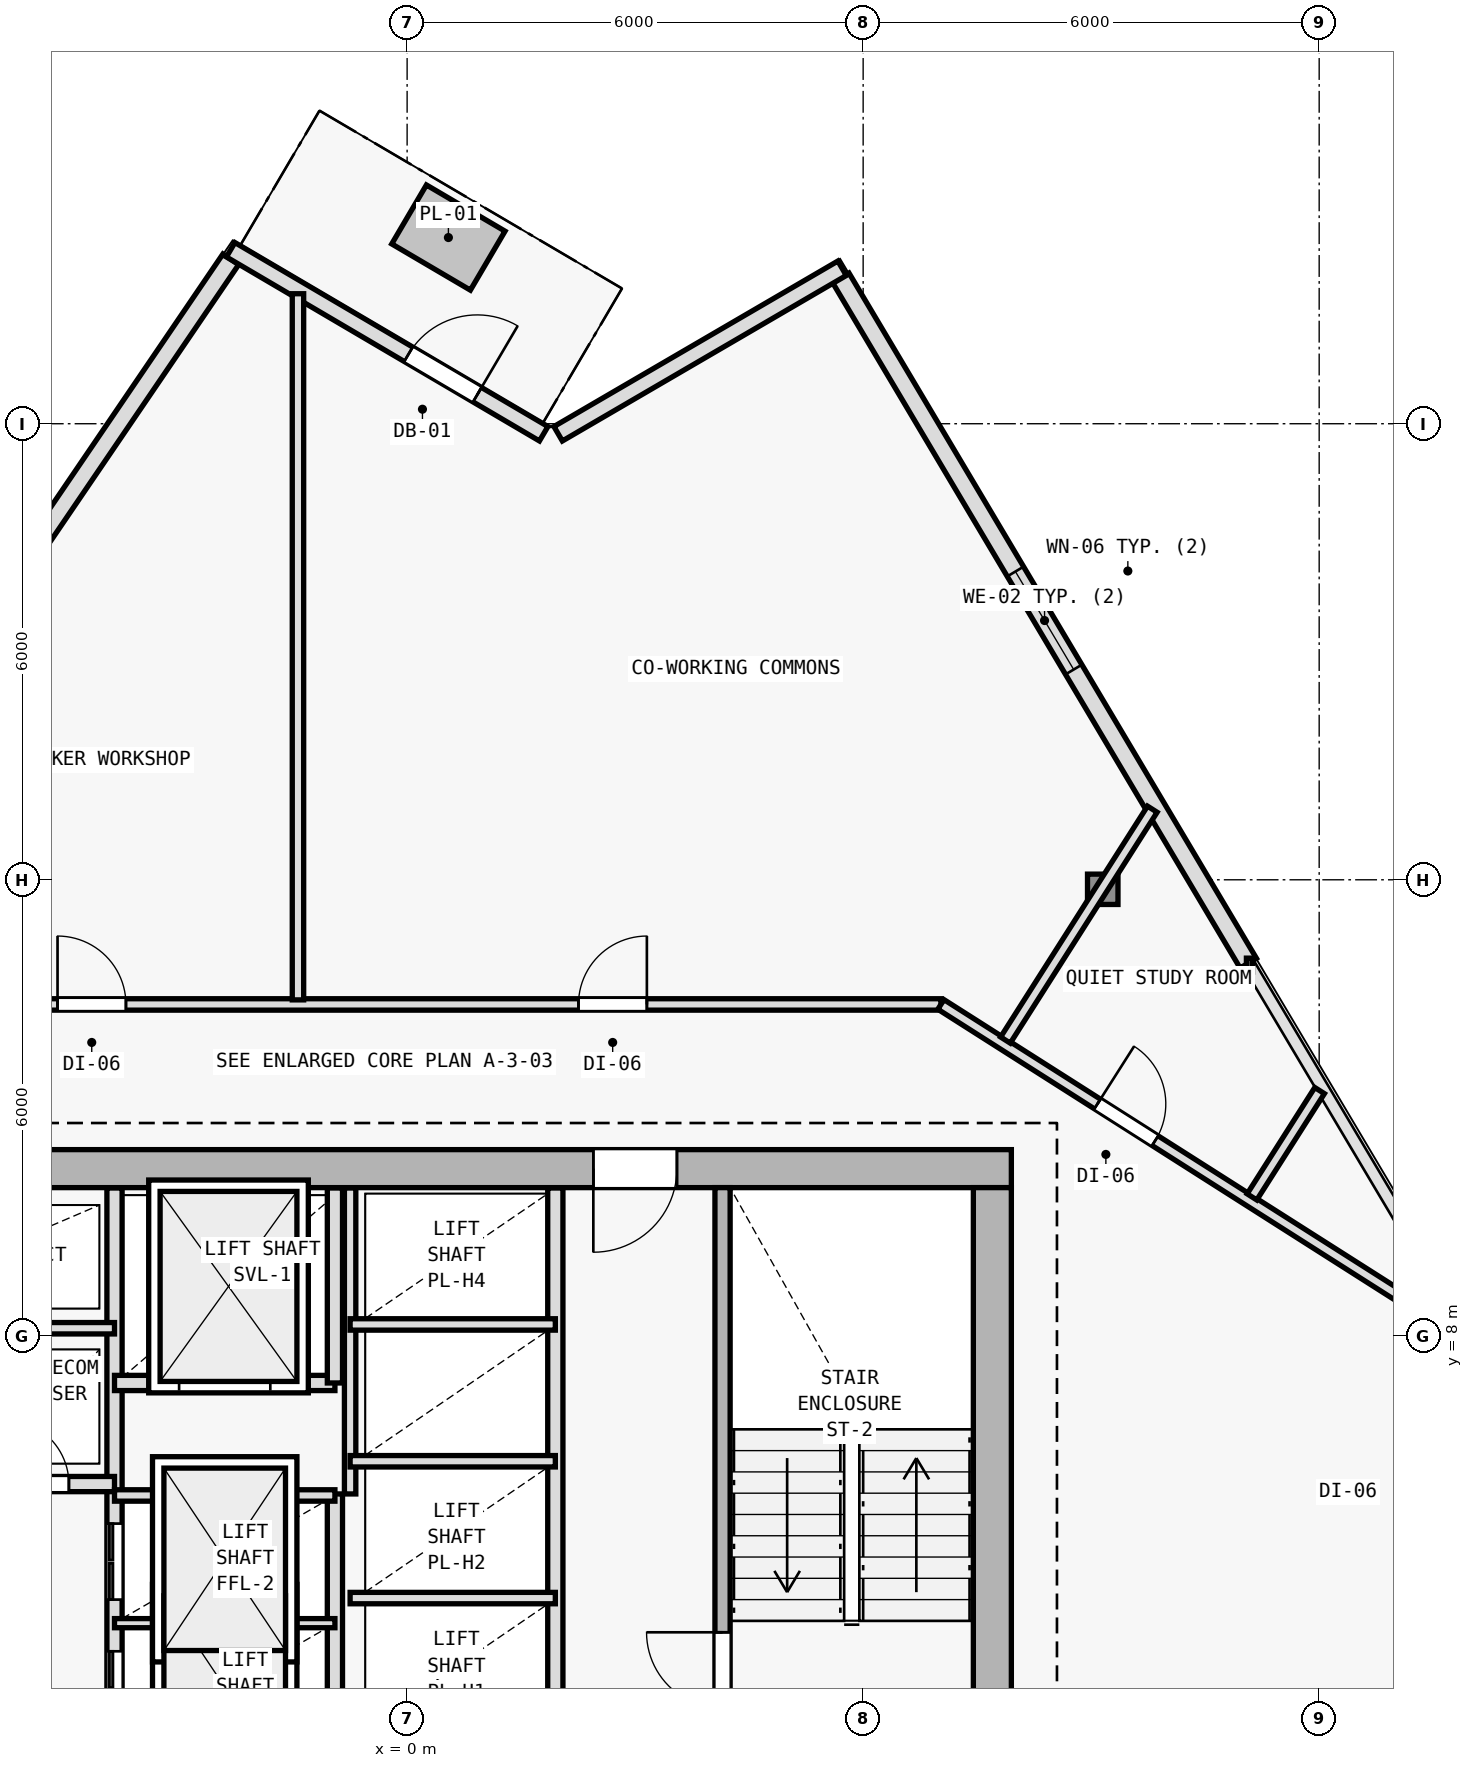
"""IFC4 building model, lengths in metres.
Left out: names, types, materials, properties, quantities, classifications, styles, units other than length and angle.
Written with IfcOpenShell. Run it as: python <this file> out.ifc"""

import sys

from ifc_helpers import new_model, si_unit, direction, frame, frame_2d, origin, origin_2d, place, context, subcontext, project, spatial, rectangle, i_section, extrude, element, fill, save


model = new_model("IFC4")
c1 = context("Model", 3, precision=1e-05, world=origin(), true_north=direction((0.0, 1.0)))
c2 = subcontext(c1, "Body", "Model", "MODEL_VIEW")
j1 = project(units=[si_unit("LENGTHUNIT", "METRE"), si_unit("PLANEANGLEUNIT", "RADIAN")], contexts=[c1])
p1 = place(None, origin())
s1 = spatial("IfcSite", under=j1, at=p1, CompositionType="ELEMENT")
p2 = place(p1, origin())
s2 = spatial("IfcBuilding", under=s1, at=p2, CompositionType="ELEMENT")
p3 = place(p2, frame((0.0, 0.0, 178.2)))
s3 = spatial("IfcBuildingStorey", under=s2, at=p3, CompositionType="ELEMENT", Elevation=178.2)
p4 = place(p3, frame((7.7, 10.2, 0.0), z_axis=(0.0, 0.0, 1.0), x_axis=(1.0, 0.0, 0.0)))
e1 = element("IfcColumn", 1, at=p4, inside=s3, PredefinedType="COLUMN", context=c2, shape_type="SweptSolid", body=[
    extrude(i_section(OverallWidth=0.404, OverallDepth=0.407, WebThickness=0.017, FlangeThickness=0.028, FilletRadius=0.015, at=origin_2d()), origin(), (0.0, 0.0, 1.0), 3.6),
])
p5 = place(p3, frame((9.152, 13.875, 0.006), z_axis=(-0.011767853257, -0.00258484638, 0.999927415465), x_axis=(0.214538664031, -0.976715496773, 0.0)))
e2 = element("IfcColumn", 2, at=p5, inside=s3, PredefinedType="COLUMN", context=c2, shape_type="SweptSolid", body=[
    extrude(i_section(OverallWidth=0.401, OverallDepth=0.399, WebThickness=0.016, FlangeThickness=0.025, FilletRadius=0.015, at=origin_2d()), origin(), (0.0, 0.0, 1.0), 3.589),
])
p6 = place(p3, frame((5.706, 21.919, 0.0), z_axis=(0.0, 0.0, 1.0), x_axis=(0.511079110892, -0.859533677298, 0.0)))
e3 = element("IfcWall", 3, at=p6, inside=s3, PredefinedType="SOLIDWALL", context=c2, shape_type="SweptSolid", body=[
    extrude(rectangle(XDim=10.489, YDim=0.25, at=frame_2d((5.245, 0.0))), origin(), (0.0, 0.0, 1.0), 3.35),
])
p7 = place(p6, frame((4.495, 0.0, 0.62)))
e4 = element("IfcOpeningElement", 4, at=p7, cuts=e3, PredefinedType="OPENING", context=c2, shape_type="SweptSolid", body=[
    extrude(rectangle(XDim=1.5, YDim=2.0, at=frame_2d((0.75, 1.0))), frame((0.0, 0.135, 0.0), z_axis=(0.0, -1.0, 0.0), x_axis=(1.0, 0.0, 0.0)), (0.0, 0.0, 1.0), 0.27),
])
p8 = place(p3, frame((-8.517, 13.053, 0.0), z_axis=(0.0, 0.0, 1.0), x_axis=(0.562463961516, 0.826821801838, 0.0)))
e5 = element("IfcWall", 5, at=p8, inside=s3, PredefinedType="SOLIDWALL", context=c2, shape_type="SweptSolid", body=[
    extrude(rectangle(XDim=11.018, YDim=0.25, at=frame_2d((5.509, 0.0))), origin(), (0.0, 0.0, 1.0), 3.35),
])
p9 = place(p8, frame((4.759, 0.0, 0.62)))
e6 = element("IfcOpeningElement", 6, at=p9, cuts=e5, PredefinedType="OPENING", context=c2, shape_type="SweptSolid", body=[
    extrude(rectangle(XDim=1.5, YDim=2.0, at=frame_2d((0.75, 1.0))), frame((0.0, 0.135, 0.0), z_axis=(0.0, -1.0, 0.0), x_axis=(1.0, 0.0, 0.0)), (0.0, 0.0, 1.0), 0.27),
])
p10 = place(p3, frame((1.987, 19.868, 0.0), z_axis=(0.0, 0.0, 1.0), x_axis=(0.863979520686, 0.503526948469, 0.0)))
e7 = element("IfcWall", 7, at=p10, inside=s3, PredefinedType="SOLIDWALL", context=c2, shape_type="SweptSolid", body=[
    extrude(rectangle(XDim=4.324, YDim=0.22, at=frame_2d((2.162, 0.0))), origin(), (0.0, 0.0, 1.0), 3.35),
])
p11 = place(p3, frame((-2.322, 22.289, 0.0), z_axis=(0.0, 0.0, 1.0), x_axis=(0.862111523483, -0.506718581738, 0.0)))
e8 = element("IfcWall", 8, at=p11, inside=s3, PredefinedType="SOLIDWALL", context=c2, shape_type="SweptSolid", body=[
    extrude(rectangle(XDim=4.777, YDim=0.22, at=frame_2d((2.389, 0.0))), origin(), (0.0, 0.0, 1.0), 3.35),
])
p12 = place(p11, frame((2.714, 0.0, 0.0)))
e9 = element("IfcOpeningElement", 9, at=p12, cuts=e8, PredefinedType="OPENING", context=c2, shape_type="SweptSolid", body=[
    extrude(rectangle(XDim=1.05, YDim=2.15, at=frame_2d((0.525, 1.075))), frame((0.0, 0.12, 0.0), z_axis=(0.0, -1.0, 0.0), x_axis=(1.0, 0.0, 0.0)), (0.0, 0.0, 1.0), 0.24),
])
p13 = place(p3, frame((7.95, 10.2, 0.0), z_axis=(0.0, 0.0, 1.0), x_axis=(-1.0, 0.0, 0.0)))
e10 = element("IfcWall", 10, at=p13, inside=s3, PredefinedType="SHEAR", context=c2, shape_type="SweptSolid", body=[
    extrude(rectangle(XDim=15.9, YDim=0.5, at=frame_2d((7.95, 0.0))), origin(), (0.0, 0.0, 1.0), 3.35),
])
p14 = place(p13, frame((4.4, 0.0, 0.0)))
e11 = element("IfcOpeningElement", 11, at=p14, cuts=e10, PredefinedType="OPENING", context=c2, shape_type="SweptSolid", body=[
    extrude(rectangle(XDim=1.1, YDim=2.15, at=frame_2d((0.55, 1.075))), frame((0.0, 0.26, 0.0), z_axis=(0.0, -1.0, 0.0), x_axis=(1.0, 0.0, 0.0)), (0.0, 0.0, 1.0), 0.52),
])
p15 = place(p3, frame((7.7, 9.95, 0.0), z_axis=(0.0, 0.0, 1.0), x_axis=(0.0, -1.0, 0.0)))
e12 = element("IfcWall", 12, at=p15, inside=s3, PredefinedType="SHEAR", context=c2, shape_type="SweptSolid", body=[
    extrude(rectangle(XDim=19.1, YDim=0.5, at=frame_2d((9.55, 0.0))), origin(), (0.0, 0.0, 1.0), 3.35),
])
p16 = place(p3, frame((-3.85, 1.35, 0.0), z_axis=(0.0, 0.0, 1.0), x_axis=(0.0, 1.0, 0.0)))
e13 = element("IfcWall", 13, at=p16, inside=s3, PredefinedType="SOLIDWALL", context=c2, shape_type="SweptSolid", body=[
    extrude(rectangle(XDim=8.595, YDim=0.2, at=frame_2d((4.297, 0.0))), origin(), (0.0, 0.0, 1.0), 3.35),
])
p17 = place(p16, frame((1.5, 0.0, 0.0)))
e14 = element("IfcOpeningElement", 14, at=p17, cuts=e13, PredefinedType="OPENING", context=c2, shape_type="SweptSolid", body=[
    extrude(rectangle(XDim=1.0, YDim=2.15, at=frame_2d((0.5, 1.075))), frame((0.0, 0.11, 0.0), z_axis=(0.0, -1.0, 0.0), x_axis=(1.0, 0.0, 0.0)), (0.0, 0.0, 1.0), 0.22),
])
p18 = place(p16, frame((3.18, 0.0, 0.0)))
e15 = element("IfcOpeningElement", 15, at=p18, cuts=e13, PredefinedType="OPENING", context=c2, shape_type="SweptSolid", body=[
    extrude(rectangle(XDim=1.0, YDim=2.15, at=frame_2d((0.5, 1.075))), frame((0.0, 0.11, 0.0), z_axis=(0.0, -1.0, 0.0), x_axis=(1.0, 0.0, 0.0)), (0.0, 0.0, 1.0), 0.22),
])
p19 = place(p3, frame((-7.445, 6.05, 0.0), z_axis=(0.0, 0.0, 1.0), x_axis=(1.0, 0.0, 0.0)))
e16 = element("IfcWall", 16, at=p19, inside=s3, PredefinedType="SOLIDWALL", context=c2, shape_type="SweptSolid", body=[
    extrude(rectangle(XDim=3.595, YDim=0.2, at=frame_2d((1.797, 0.0))), origin(), (0.0, 0.0, 1.0), 3.35),
])
p20 = place(p19, frame((0.345, 0.0, 0.0)))
e17 = element("IfcOpeningElement", 17, at=p20, cuts=e16, PredefinedType="OPENING", context=c2, shape_type="SweptSolid", body=[
    extrude(rectangle(XDim=0.85, YDim=2.1, at=frame_2d((0.425, 1.05))), frame((0.0, 0.11, 0.0), z_axis=(0.0, -1.0, 0.0), x_axis=(1.0, 0.0, 0.0)), (0.0, 0.0, 1.0), 0.22),
])
p21 = place(p19, frame((2.145, 0.0, 0.0)))
e18 = element("IfcOpeningElement", 18, at=p21, cuts=e16, PredefinedType="OPENING", context=c2, shape_type="SweptSolid", body=[
    extrude(rectangle(XDim=0.85, YDim=2.1, at=frame_2d((0.425, 1.05))), frame((0.0, 0.11, 0.0), z_axis=(0.0, -1.0, 0.0), x_axis=(1.0, 0.0, 0.0)), (0.0, 0.0, 1.0), 0.22),
])
p22 = place(p3, frame((-7.445, 8.1, 0.0), z_axis=(0.0, 0.0, 1.0), x_axis=(1.0, 0.0, 0.0)))
e19 = element("IfcWall", 19, at=p22, inside=s3, PredefinedType="PARTITIONING", context=c2, shape_type="SweptSolid", body=[
    extrude(rectangle(XDim=3.595, YDim=0.15, at=frame_2d((1.797, 0.0))), origin(), (0.0, 0.0, 1.0), 3.35),
])
p23 = place(p3, frame((4.15, 2.75, 0.0), z_axis=(0.0, 0.0, 1.0), x_axis=(0.0, 1.0, 0.0)))
e20 = element("IfcWall", 20, at=p23, inside=s3, PredefinedType="SOLIDWALL", context=c2, shape_type="SweptSolid", body=[
    extrude(rectangle(XDim=7.2, YDim=0.2, at=frame_2d((3.6, 0.0))), origin(), (0.0, 0.0, 1.0), 3.35),
])
p24 = place(p23, frame((0.35, 0.0, 0.0)))
e21 = element("IfcOpeningElement", 21, at=p24, cuts=e20, PredefinedType="OPENING", context=c2, shape_type="SweptSolid", body=[
    extrude(rectangle(XDim=1.0, YDim=2.15, at=frame_2d((0.5, 1.075))), frame((0.0, 0.11, 0.0), z_axis=(0.0, -1.0, 0.0), x_axis=(1.0, 0.0, 0.0)), (0.0, 0.0, 1.0), 0.22),
])
p25 = place(p3, frame((-0.95, 2.65, 0.0), z_axis=(0.0, 0.0, 1.0), x_axis=(0.0, 1.0, 0.0)))
e22 = element("IfcWall", 22, at=p25, inside=s3, PredefinedType="SOLIDWALL", context=c2, shape_type="SweptSolid", body=[
    extrude(rectangle(XDim=3.27, YDim=0.2, at=frame_2d((1.635, 0.0))), origin(), (0.0, 0.0, 1.0), 3.35),
])
p26 = place(p3, frame((-3.85, 4.22, 0.0), z_axis=(0.0, 0.0, 1.0), x_axis=(1.0, 0.0, 0.0)))
e23 = element("IfcWall", 23, at=p26, inside=s3, PredefinedType="PARTITIONING", context=c2, shape_type="SweptSolid", body=[
    extrude(rectangle(XDim=2.9, YDim=0.12, at=frame_2d((1.45, 0.0))), origin(), (0.0, 0.0, 1.0), 3.35),
])
p27 = place(p3, frame((-3.85, 5.9, 0.0), z_axis=(0.0, 0.0, 1.0), x_axis=(1.0, 0.0, 0.0)))
e24 = element("IfcWall", 24, at=p27, inside=s3, PredefinedType="PARTITIONING", context=c2, shape_type="SweptSolid", body=[
    extrude(rectangle(XDim=2.9, YDim=0.15, at=frame_2d((1.45, 0.0))), origin(), (0.0, 0.0, 1.0), 3.35),
])
p28 = place(p3, frame((-3.85, 7.38, 0.0), z_axis=(0.0, 0.0, 1.0), x_axis=(1.0, 0.0, 0.0)))
e25 = element("IfcWall", 25, at=p28, inside=s3, PredefinedType="SOLIDWALL", context=c2, shape_type="SweptSolid", body=[
    extrude(rectangle(XDim=2.9, YDim=0.2, at=frame_2d((1.45, 0.0))), origin(), (0.0, 0.0, 1.0), 3.35),
])
p29 = place(p28, frame((0.85, 0.0, 0.0)))
e26 = element("IfcOpeningElement", 26, at=p29, cuts=e25, PredefinedType="OPENING", context=c2, shape_type="SweptSolid", body=[
    extrude(rectangle(XDim=1.2, YDim=2.2, at=frame_2d((0.6, 1.1))), frame((0.0, 0.11, 0.0), z_axis=(0.0, -1.0, 0.0), x_axis=(1.0, 0.0, 0.0)), (0.0, 0.0, 1.0), 0.22),
])
p30 = place(p3, frame((-0.95, 7.38, 0.0), z_axis=(0.0, 0.0, 1.0), x_axis=(0.0, 1.0, 0.0)))
e27 = element("IfcWall", 27, at=p30, inside=s3, PredefinedType="SOLIDWALL", context=c2, shape_type="SweptSolid", body=[
    extrude(rectangle(XDim=2.565, YDim=0.2, at=frame_2d((1.283, 0.0))), origin(), (0.0, 0.0, 1.0), 3.35),
])
p31 = place(p3, frame((1.95, 2.65, 0.0), z_axis=(0.0, 0.0, 1.0), x_axis=(0.0, 1.0, 0.0)))
e28 = element("IfcWall", 28, at=p31, inside=s3, PredefinedType="SOLIDWALL", context=c2, shape_type="SweptSolid", body=[
    extrude(rectangle(XDim=7.295, YDim=0.2, at=frame_2d((3.647, 0.0))), origin(), (0.0, 0.0, 1.0), 3.35),
])
p32 = place(p3, frame((-0.75, 5.92, 0.0), z_axis=(0.0, 0.0, 1.0), x_axis=(0.0, 1.0, 0.0)))
e29 = element("IfcWall", 29, at=p32, inside=s3, PredefinedType="PARTITIONING", context=c2, shape_type="SweptSolid", body=[
    extrude(rectangle(XDim=4.025, YDim=0.15, at=frame_2d((2.013, 0.0))), origin(), (0.0, 0.0, 1.0), 3.35),
])
for number, where, z_axis, x_axis in (
    (30, (-0.75, 4.55, 0.0), (0.0, 0.0, 1.0), (1.0, 0.0, 0.0)),
    (31, (-0.75, 6.35, 0.0), (0.0, 0.0, 1.0), (1.0, 0.0, 0.0)),
    (32, (-0.75, 8.15, 0.0), (0.0, 0.0, 1.0), (1.0, 0.0, 0.0)),
):
    element("IfcWall", number, at=place(p3, frame(where, z_axis=z_axis, x_axis=x_axis)), inside=s3, PredefinedType="PARTITIONING", context=c2, shape_type="SweptSolid", body=[
        extrude(rectangle(XDim=2.7, YDim=0.15, at=frame_2d((1.35, 0.0))), origin(), (0.0, 0.0, 1.0), 3.35),
    ])
p33 = place(p3, frame((-7.041, 12.36, 0.0), z_axis=(0.0, 0.0, 1.0), x_axis=(1.0, 0.0, 0.0)))
e33 = element("IfcWall", 33, at=p33, inside=s3, PredefinedType="PARTITIONING", context=c2, shape_type="SweptSolid", body=[
    extrude(rectangle(XDim=14.064, YDim=0.15, at=frame_2d((7.032, 0.0))), origin(), (0.0, 0.0, 1.0), 3.005),
])
p34 = place(p33, frame((9.296, 0.0, 0.0)))
e34 = element("IfcOpeningElement", 34, at=p34, cuts=e33, PredefinedType="OPENING", context=c2, shape_type="SweptSolid", body=[
    extrude(rectangle(XDim=0.9, YDim=2.1, at=frame_2d((0.45, 1.05))), frame((0.0, 0.085, 0.0), z_axis=(0.0, -1.0, 0.0), x_axis=(1.0, 0.0, 0.0)), (0.0, 0.0, 1.0), 0.17),
])
p35 = place(p33, frame((2.442, 0.0, 0.0)))
e35 = element("IfcOpeningElement", 35, at=p35, cuts=e33, PredefinedType="OPENING", context=c2, shape_type="SweptSolid", body=[
    extrude(rectangle(XDim=0.9, YDim=2.1, at=frame_2d((0.45, 1.05))), frame((0.0, 0.085, 0.0), z_axis=(0.0, -1.0, 0.0), x_axis=(1.0, 0.0, 0.0)), (0.0, 0.0, 1.0), 0.17),
])
p36 = place(p3, frame((7.023, 12.36, 0.0), z_axis=(0.0, 0.0, 1.0), x_axis=(0.84376480085, -0.536713108511, 0.0)))
e36 = element("IfcWall", 36, at=p36, inside=s3, PredefinedType="PARTITIONING", context=c2, shape_type="SweptSolid", body=[
    extrude(rectangle(XDim=7.297, YDim=0.15, at=frame_2d((3.648, 0.0))), origin(), (0.0, 0.0, 1.0), 2.725),
])
p37 = place(p36, frame((2.44, 0.0, 0.0)))
e37 = element("IfcOpeningElement", 37, at=p37, cuts=e36, PredefinedType="OPENING", context=c2, shape_type="SweptSolid", body=[
    extrude(rectangle(XDim=0.9, YDim=2.1, at=frame_2d((0.45, 1.05))), frame((0.0, 0.085, 0.0), z_axis=(0.0, -1.0, 0.0), x_axis=(1.0, 0.0, 0.0)), (0.0, 0.0, 1.0), 0.17),
])
p38 = place(p3, frame((7.872, 11.891, 0.0), z_axis=(0.0, 0.0, 1.0), x_axis=(0.536699955458, 0.843773167274, 0.0)))
e38 = element("IfcWall", 38, at=p38, inside=s3, PredefinedType="PARTITIONING", context=c2, shape_type="SweptSolid", body=[
    extrude(rectangle(XDim=3.6, YDim=0.15, at=frame_2d((1.8, 0.0))), origin(), (0.0, 0.0, 1.0), 2.935),
])
p39 = place(p3, frame((11.116, 9.828, 0.0), z_axis=(0.0, 0.0, 1.0), x_axis=(0.536732563691, 0.843752425226, 0.0)))
e39 = element("IfcWall", 39, at=p39, inside=s3, PredefinedType="PARTITIONING", context=c2, shape_type="SweptSolid", body=[
    extrude(rectangle(XDim=1.658, YDim=0.15, at=frame_2d((0.829, 0.0))), origin(), (0.0, 0.0, 1.0), 2.935),
])
p40 = place(p3, frame((-1.436, 12.42, 0.0), z_axis=(0.0, 0.0, 1.0), x_axis=(0.0, 1.0, 0.0)))
e40 = element("IfcWall", 40, at=p40, inside=s3, PredefinedType="PARTITIONING", context=c2, shape_type="SweptSolid", body=[
    extrude(rectangle(XDim=9.29, YDim=0.15, at=frame_2d((4.645, 0.0))), origin(), (0.0, 0.0, 1.0), 2.935),
])
p41 = place(p7, origin())
e41 = element("IfcWindow", 41, at=p41, inside=s3, PartitioningType="SINGLE_PANEL", PredefinedType="WINDOW", context=c2, shape_type="SweptSolid", body=[
    extrude(rectangle(XDim=1.5, YDim=2.0, at=frame_2d((0.75, 1.0))), frame((0.0, 0.03, 0.0), z_axis=(0.0, -1.0, 0.0), x_axis=(1.0, 0.0, 0.0)), (0.0, 0.0, 1.0), 0.06),
])
fill(e4, e41)
p42 = place(p12, origin())
e42 = element("IfcDoor", 42, at=p42, inside=s3, OperationType="SINGLE_SWING_RIGHT", PredefinedType="DOOR", context=c2, shape_type="SweptSolid", body=[
    extrude(rectangle(XDim=1.05, YDim=2.15, at=frame_2d((0.525, 1.075))), frame((0.0, 0.025, 0.0), z_axis=(0.0, -1.0, 0.0), x_axis=(1.0, 0.0, 0.0)), (0.0, 0.0, 1.0), 0.05),
])
fill(e9, e42)
p43 = place(p14, origin())
e43 = element("IfcDoor", 43, at=p43, inside=s3, OperationType="SINGLE_SWING_RIGHT", PredefinedType="DOOR", context=c2, shape_type="SweptSolid", body=[
    extrude(rectangle(XDim=1.1, YDim=2.15, at=frame_2d((0.55, 1.075))), frame((0.0, 0.025, 0.0), z_axis=(0.0, -1.0, 0.0), x_axis=(1.0, 0.0, 0.0)), (0.0, 0.0, 1.0), 0.05),
])
fill(e11, e43)
p44 = place(p21, origin())
e44 = element("IfcDoor", 44, at=p44, inside=s3, OperationType="SINGLE_SWING_LEFT", PredefinedType="DOOR", context=c2, shape_type="SweptSolid", body=[
    extrude(rectangle(XDim=0.85, YDim=2.1, at=frame_2d((0.425, 1.05))), frame((0.0, 0.025, 0.0), z_axis=(0.0, -1.0, 0.0), x_axis=(1.0, 0.0, 0.0)), (0.0, 0.0, 1.0), 0.05),
])
fill(e18, e44)
p45 = place(p24, origin())
e45 = element("IfcDoor", 45, at=p45, inside=s3, OperationType="SINGLE_SWING_RIGHT", PredefinedType="DOOR", context=c2, shape_type="SweptSolid", body=[
    extrude(rectangle(XDim=1.0, YDim=2.15, at=frame_2d((0.5, 1.075))), frame((0.0, 0.025, 0.0), z_axis=(0.0, -1.0, 0.0), x_axis=(1.0, 0.0, 0.0)), (0.0, 0.0, 1.0), 0.05),
])
fill(e21, e45)
p46 = place(p29, origin())
e46 = element("IfcDoor", 46, at=p46, inside=s3, OperationType="DOUBLE_DOOR_SLIDING", PredefinedType="DOOR", context=c2, shape_type="SweptSolid", body=[
    extrude(rectangle(XDim=1.2, YDim=2.2, at=frame_2d((0.6, 1.1))), frame((0.0, 0.025, 0.0), z_axis=(0.0, -1.0, 0.0), x_axis=(1.0, 0.0, 0.0)), (0.0, 0.0, 1.0), 0.05),
])
fill(e26, e46)
p47 = place(p17, origin())
e47 = element("IfcDoor", 47, at=p47, inside=s3, OperationType="DOUBLE_DOOR_SLIDING", PredefinedType="DOOR", context=c2, shape_type="SweptSolid", body=[
    extrude(rectangle(XDim=1.0, YDim=2.15, at=frame_2d((0.5, 1.075))), frame((0.0, 0.025, 0.0), z_axis=(0.0, -1.0, 0.0), x_axis=(1.0, 0.0, 0.0)), (0.0, 0.0, 1.0), 0.05),
])
fill(e14, e47)
p48 = place(p18, origin())
e48 = element("IfcDoor", 48, at=p48, inside=s3, OperationType="DOUBLE_DOOR_SLIDING", PredefinedType="DOOR", context=c2, shape_type="SweptSolid", body=[
    extrude(rectangle(XDim=1.0, YDim=2.15, at=frame_2d((0.5, 1.075))), frame((0.0, 0.025, 0.0), z_axis=(0.0, -1.0, 0.0), x_axis=(1.0, 0.0, 0.0)), (0.0, 0.0, 1.0), 0.05),
])
fill(e15, e48)
p49 = place(p37, origin())
e49 = element("IfcDoor", 49, at=p49, inside=s3, OperationType="SINGLE_SWING_LEFT", PredefinedType="DOOR", context=c2, shape_type="SweptSolid", body=[
    extrude(rectangle(XDim=0.9, YDim=2.1, at=frame_2d((0.45, 1.05))), frame((0.0, 0.025, 0.0), z_axis=(0.0, -1.0, 0.0), x_axis=(1.0, 0.0, 0.0)), (0.0, 0.0, 1.0), 0.05),
])
fill(e37, e49)
p50 = place(p34, origin())
e50 = element("IfcDoor", 50, at=p50, inside=s3, OperationType="SINGLE_SWING_RIGHT", PredefinedType="DOOR", context=c2, shape_type="SweptSolid", body=[
    extrude(rectangle(XDim=0.9, YDim=2.1, at=frame_2d((0.45, 1.05))), frame((0.0, 0.025, 0.0), z_axis=(0.0, -1.0, 0.0), x_axis=(1.0, 0.0, 0.0)), (0.0, 0.0, 1.0), 0.05),
])
fill(e34, e50)
p51 = place(p35, origin())
e51 = element("IfcDoor", 51, at=p51, inside=s3, OperationType="SINGLE_SWING_LEFT", PredefinedType="DOOR", context=c2, shape_type="SweptSolid", body=[
    extrude(rectangle(XDim=0.9, YDim=2.1, at=frame_2d((0.45, 1.05))), frame((0.0, 0.025, 0.0), z_axis=(0.0, -1.0, 0.0), x_axis=(1.0, 0.0, 0.0)), (0.0, 0.0, 1.0), 0.05),
])
fill(e35, e51)
save(model, sys.argv[1])
